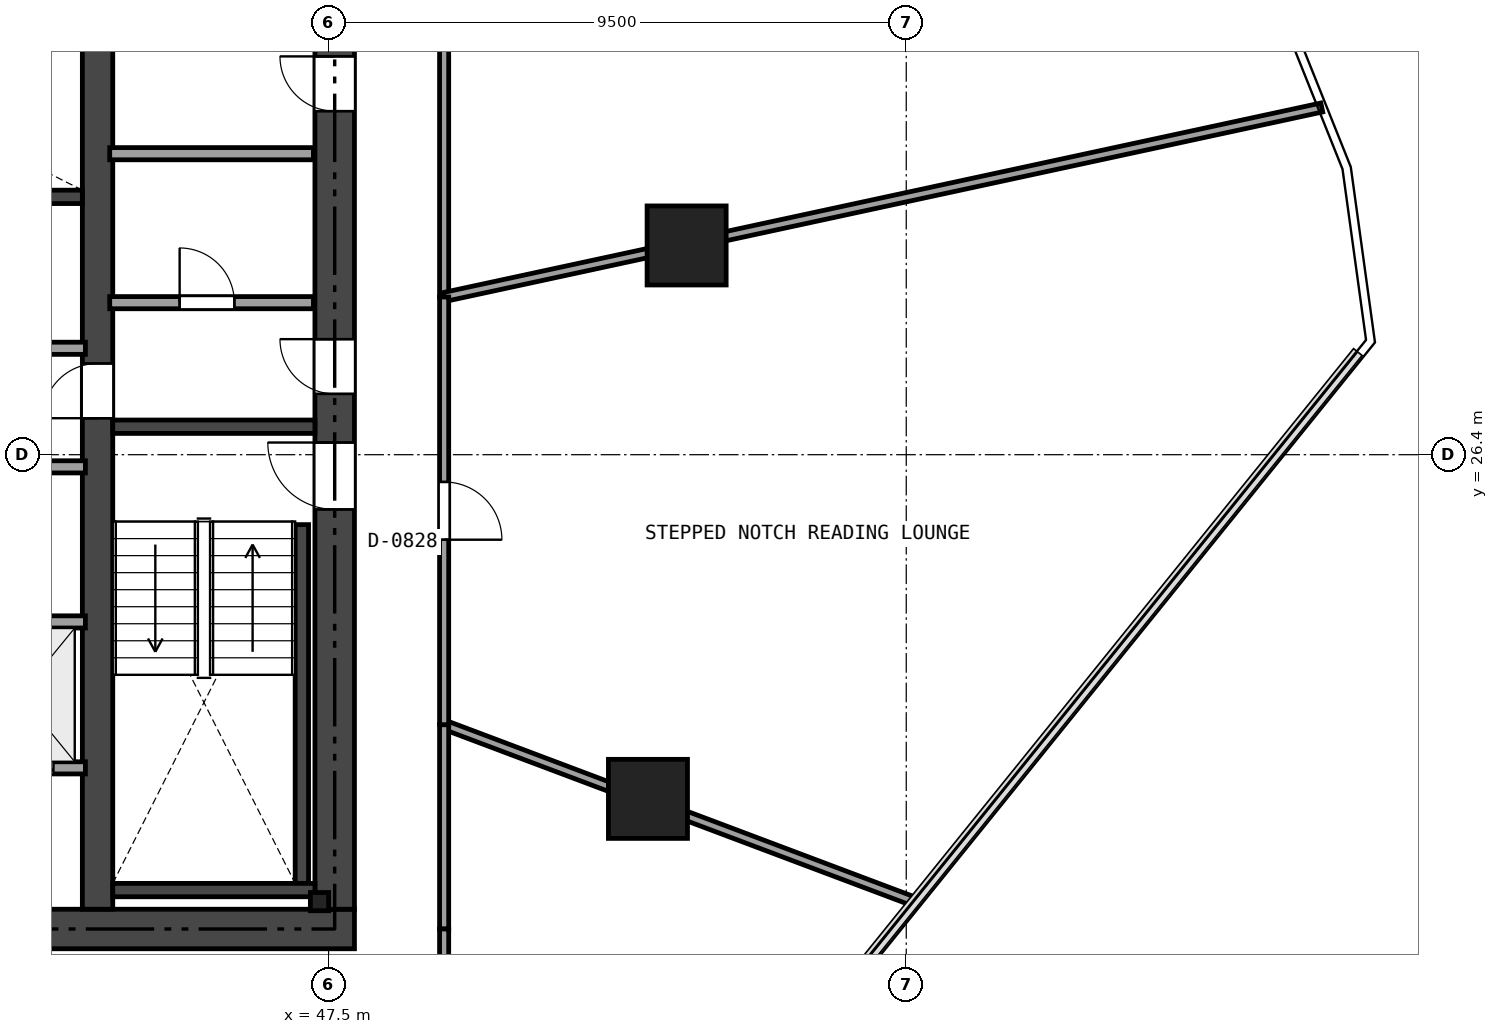
"""IFC4 building model, lengths in metres.
Left out: names, types, materials, properties, quantities, classifications, styles, units other than length and angle.
Written with IfcOpenShell. Run it as: python <this file> out.ifc"""

import sys

from ifc_helpers import new_model, si_unit, direction, frame, frame_2d, origin, origin_2d, place, context, subcontext, project, spatial, rectangle, i_section, extrude, element, fill, save


model = new_model("IFC4")
c1 = context("Model", 3, precision=1e-05, world=origin(), true_north=direction((0.0, 1.0)))
c2 = subcontext(c1, "Body", "Model", "MODEL_VIEW")
j1 = project(units=[si_unit("LENGTHUNIT", "METRE"), si_unit("PLANEANGLEUNIT", "RADIAN")], contexts=[c1])
p1 = place(None, origin())
s1 = spatial("IfcSite", under=j1, at=p1, CompositionType="ELEMENT")
p2 = place(p1, origin())
s2 = spatial("IfcBuilding", under=s1, at=p2, CompositionType="ELEMENT")
p3 = place(p2, frame((0.0, 0.0, 37.35)))
s3 = spatial("IfcBuildingStorey", under=s2, at=p3, CompositionType="ELEMENT", Elevation=37.35)
p4 = place(p3, frame((26.475, 18.6, 0.0), z_axis=(0.0, 0.0, 1.0), x_axis=(1.0, 0.0, 0.0)))
e1 = element("IfcWall", 1, at=p4, inside=s3, PredefinedType="SHEAR", context=c2, shape_type="SweptSolid", body=[
    extrude(rectangle(XDim=21.45, YDim=0.65, at=frame_2d((10.725, 0.0))), origin(), (0.0, 0.0, 1.0), 3.17),
])
p5 = place(p4, frame((12.45, 0.0, 0.0)))
e2 = element("IfcOpeningElement", 2, at=p5, cuts=e1, PredefinedType="OPENING", context=c2, shape_type="SweptSolid", body=[
    extrude(rectangle(XDim=1.15, YDim=2.15, at=frame_2d((0.575, 1.075))), frame((0.0, 0.335, 0.0), z_axis=(0.0, -1.0, 0.0), x_axis=(1.0, 0.0, 0.0)), (0.0, 0.0, 1.0), 0.67),
])
p6 = place(p4, frame((5.275, 0.0, 0.0)))
e3 = element("IfcOpeningElement", 3, at=p6, cuts=e1, PredefinedType="OPENING", context=c2, shape_type="SweptSolid", body=[
    extrude(rectangle(XDim=0.9, YDim=2.1, at=frame_2d((0.45, 1.05))), frame((0.0, 0.335, 0.0), z_axis=(0.0, -1.0, 0.0), x_axis=(1.0, 0.0, 0.0)), (0.0, 0.0, 1.0), 0.67),
])
p7 = place(p3, frame((47.6, 18.925, 0.0), z_axis=(0.0, 0.0, 1.0), x_axis=(0.0, 1.0, 0.0)))
e4 = element("IfcWall", 4, at=p7, inside=s3, PredefinedType="SHEAR", context=c2, shape_type="SweptSolid", body=[
    extrude(rectangle(XDim=14.95, YDim=0.65, at=frame_2d((7.475, 0.0))), origin(), (0.0, 0.0, 1.0), 3.17),
])
p8 = place(p7, frame((6.575, 0.0, 0.0)))
e5 = element("IfcOpeningElement", 5, at=p8, cuts=e4, PredefinedType="OPENING", context=c2, shape_type="SweptSolid", body=[
    extrude(rectangle(XDim=1.1, YDim=2.15, at=frame_2d((0.55, 1.075))), frame((0.0, 0.335, 0.0), z_axis=(0.0, -1.0, 0.0), x_axis=(1.0, 0.0, 0.0)), (0.0, 0.0, 1.0), 0.67),
])
p9 = place(p7, frame((8.475, 0.0, 0.0)))
e6 = element("IfcOpeningElement", 6, at=p9, cuts=e4, PredefinedType="OPENING", context=c2, shape_type="SweptSolid", body=[
    extrude(rectangle(XDim=0.9, YDim=2.1, at=frame_2d((0.45, 1.05))), frame((0.0, 0.335, 0.0), z_axis=(0.0, -1.0, 0.0), x_axis=(1.0, 0.0, 0.0)), (0.0, 0.0, 1.0), 0.67),
])
p10 = place(p7, frame((13.125, 0.0, 0.0)))
e7 = element("IfcOpeningElement", 7, at=p10, cuts=e4, PredefinedType="OPENING", context=c2, shape_type="SweptSolid", body=[
    extrude(rectangle(XDim=0.9, YDim=2.1, at=frame_2d((0.45, 1.05))), frame((0.0, 0.335, 0.0), z_axis=(0.0, -1.0, 0.0), x_axis=(1.0, 0.0, 0.0)), (0.0, 0.0, 1.0), 0.67),
])
p11 = place(p3, frame((43.7, 18.925, 0.0), z_axis=(0.0, 0.0, 1.0), x_axis=(0.0, 1.0, 0.0)))
e8 = element("IfcWall", 8, at=p11, inside=s3, PredefinedType="SHEAR", context=c2, shape_type="SweptSolid", body=[
    extrude(rectangle(XDim=14.95, YDim=0.5, at=frame_2d((7.475, 0.0))), origin(), (0.0, 0.0, 1.0), 3.17),
])
p12 = place(p11, frame((8.075, 0.0, 0.0)))
e9 = element("IfcOpeningElement", 9, at=p12, cuts=e8, PredefinedType="OPENING", context=c2, shape_type="SweptSolid", body=[
    extrude(rectangle(XDim=0.9, YDim=2.1, at=frame_2d((0.45, 1.05))), frame((0.0, 0.26, 0.0), z_axis=(0.0, -1.0, 0.0), x_axis=(1.0, 0.0, 0.0)), (0.0, 0.0, 1.0), 0.52),
])
p13 = place(p3, frame((43.95, 26.86, 0.0), z_axis=(0.0, 0.0, 1.0), x_axis=(1.0, 0.0, 0.0)))
e10 = element("IfcWall", 10, at=p13, inside=s3, PredefinedType="SHEAR", context=c2, shape_type="SweptSolid", body=[
    extrude(rectangle(XDim=3.325, YDim=0.22, at=frame_2d((1.663, 0.0))), origin(), (0.0, 0.0, 1.0), 3.17),
])
p14 = place(p3, frame((47.06, 19.35, 0.0), z_axis=(0.0, 0.0, 1.0), x_axis=(0.0, 1.0, 0.0)))
e11 = element("IfcWall", 11, at=p14, inside=s3, PredefinedType="SHEAR", context=c2, shape_type="SweptSolid", body=[
    extrude(rectangle(XDim=5.9, YDim=0.22, at=frame_2d((2.95, 0.0))), origin(), (0.0, 0.0, 1.0), 3.17),
])
p15 = place(p3, frame((43.95, 19.24, 0.0), z_axis=(0.0, 0.0, 1.0), x_axis=(1.0, 0.0, 0.0)))
e12 = element("IfcWall", 12, at=p15, inside=s3, PredefinedType="SHEAR", context=c2, shape_type="SweptSolid", body=[
    extrude(rectangle(XDim=3.325, YDim=0.22, at=frame_2d((1.663, 0.0))), origin(), (0.0, 0.0, 1.0), 3.17),
])
p16 = place(p3, frame((35.84, 30.64, 0.0), z_axis=(0.0, 0.0, 1.0), x_axis=(1.0, 0.0, 0.0)))
e13 = element("IfcWall", 13, at=p16, inside=s3, PredefinedType="SHEAR", context=c2, shape_type="SweptSolid", body=[
    extrude(rectangle(XDim=7.61, YDim=0.22, at=frame_2d((3.805, 0.0))), origin(), (0.0, 0.0, 1.0), 3.17),
])
for number, where, z_axis, x_axis in (
    (14, (53.388, 29.841, 0.0), (0.0, 0.0, 1.0), (1.0, 0.0, 0.0)),
    (15, (52.752, 20.74, 0.0), (0.0, 0.0, 1.0), (1.0, 0.0, 0.0)),
):
    element("IfcColumn", number, at=place(p3, frame(where, z_axis=z_axis, x_axis=x_axis)), inside=s3, PredefinedType="COLUMN", context=c2, shape_type="SweptSolid", body=[
        extrude(rectangle(XDim=1.3, YDim=1.3, at=origin_2d()), origin(), (0.0, 0.0, 1.0), 3.17),
    ])
p17 = place(p3, frame((47.35, 19.05, 0.0), z_axis=(0.0, 0.0, 1.0), x_axis=(1.0, 0.0, 0.0)))
e16 = element("IfcColumn", 16, at=p17, inside=s3, PredefinedType="PILASTER", context=c2, shape_type="SweptSolid", body=[
    extrude(i_section(OverallWidth=0.3, OverallDepth=0.3, WebThickness=0.011, FlangeThickness=0.019, at=origin_2d()), origin(), (0.0, 0.0, 1.0), 3.17),
])
p18 = place(p3, frame((43.9, 28.9, 0.0), z_axis=(0.0, 0.0, 1.0), x_axis=(1.0, 0.0, 0.0)))
e17 = element("IfcWall", 17, at=p18, inside=s3, PredefinedType="SOLIDWALL", context=c2, shape_type="SweptSolid", body=[
    extrude(rectangle(XDim=3.35, YDim=0.2, at=frame_2d((1.675, 0.0))), origin(), (0.0, 0.0, 1.0), 3.17),
])
p19 = place(p18, frame((1.15, 0.0, 0.0)))
e18 = element("IfcOpeningElement", 18, at=p19, cuts=e17, PredefinedType="OPENING", context=c2, shape_type="SweptSolid", body=[
    extrude(rectangle(XDim=0.9, YDim=2.1, at=frame_2d((0.45, 1.05))), frame((0.0, 0.11, 0.0), z_axis=(0.0, -1.0, 0.0), x_axis=(1.0, 0.0, 0.0)), (0.0, 0.0, 1.0), 0.22),
])
p20 = place(p3, frame((43.9, 31.35, 0.0), z_axis=(0.0, 0.0, 1.0), x_axis=(1.0, 0.0, 0.0)))
e19 = element("IfcWall", 19, at=p20, inside=s3, PredefinedType="SOLIDWALL", context=c2, shape_type="SweptSolid", body=[
    extrude(rectangle(XDim=3.35, YDim=0.2, at=frame_2d((1.675, 0.0))), origin(), (0.0, 0.0, 1.0), 3.17),
])
for number, where, z_axis, x_axis in (
    (20, (35.62, 28.15, 0.0), (0.0, 0.0, 1.0), (1.0, 0.0, 0.0)),
    (21, (35.62, 26.2, 0.0), (0.0, 0.0, 1.0), (1.0, 0.0, 0.0)),
):
    element("IfcWall", number, at=place(p3, frame(where, z_axis=z_axis, x_axis=x_axis)), inside=s3, PredefinedType="SOLIDWALL", context=c2, shape_type="SweptSolid", body=[
        extrude(rectangle(XDim=7.88, YDim=0.2, at=frame_2d((3.94, 0.0))), origin(), (0.0, 0.0, 1.0), 3.17),
    ])
p21 = place(p3, frame((35.62, 23.65, 0.0), z_axis=(0.0, 0.0, 1.0), x_axis=(1.0, 0.0, 0.0)))
e22 = element("IfcWall", 22, at=p21, inside=s3, PredefinedType="SOLIDWALL", context=c2, shape_type="SweptSolid", body=[
    extrude(rectangle(XDim=7.88, YDim=0.2, at=frame_2d((3.94, 0.0))), origin(), (0.0, 0.0, 1.0), 2.691),
])
p22 = place(p3, frame((35.62, 21.25, 0.0), z_axis=(0.0, 0.0, 1.0), x_axis=(1.0, 0.0, 0.0)))
e23 = element("IfcWall", 23, at=p22, inside=s3, PredefinedType="SOLIDWALL", context=c2, shape_type="SweptSolid", body=[
    extrude(rectangle(XDim=7.88, YDim=0.2, at=frame_2d((3.94, 0.0))), origin(), (0.0, 0.0, 1.0), 3.17),
])
p23 = place(p22, frame((0.405, 0.0, 0.0)))
e24 = element("IfcOpeningElement", 24, at=p23, cuts=e23, PredefinedType="OPENING", context=c2, shape_type="SweptSolid", body=[
    extrude(rectangle(XDim=1.1, YDim=2.15, at=frame_2d((0.55, 1.075))), frame((0.0, 0.11, 0.0), z_axis=(0.0, -1.0, 0.0), x_axis=(1.0, 0.0, 0.0)), (0.0, 0.0, 1.0), 0.22),
])
p24 = place(p22, frame((2.355, 0.0, 0.0)))
e25 = element("IfcOpeningElement", 25, at=p24, cuts=e23, PredefinedType="OPENING", context=c2, shape_type="SweptSolid", body=[
    extrude(rectangle(XDim=1.1, YDim=2.15, at=frame_2d((0.55, 1.075))), frame((0.0, 0.11, 0.0), z_axis=(0.0, -1.0, 0.0), x_axis=(1.0, 0.0, 0.0)), (0.0, 0.0, 1.0), 0.22),
])
p25 = place(p22, frame((4.305, 0.0, 0.0)))
e26 = element("IfcOpeningElement", 26, at=p25, cuts=e23, PredefinedType="OPENING", context=c2, shape_type="SweptSolid", body=[
    extrude(rectangle(XDim=1.1, YDim=2.15, at=frame_2d((0.55, 1.075))), frame((0.0, 0.11, 0.0), z_axis=(0.0, -1.0, 0.0), x_axis=(1.0, 0.0, 0.0)), (0.0, 0.0, 1.0), 0.22),
])
p26 = place(p22, frame((6.255, 0.0, 0.0)))
e27 = element("IfcOpeningElement", 27, at=p26, cuts=e23, PredefinedType="OPENING", context=c2, shape_type="SweptSolid", body=[
    extrude(rectangle(XDim=1.1, YDim=2.15, at=frame_2d((0.55, 1.075))), frame((0.0, 0.11, 0.0), z_axis=(0.0, -1.0, 0.0), x_axis=(1.0, 0.0, 0.0)), (0.0, 0.0, 1.0), 0.22),
])
p27 = place(p3, frame((49.4, 34.2, 0.0), z_axis=(0.0, 0.0, 1.0), x_axis=(0.0, -1.0, 0.0)))
e28 = element("IfcWall", 28, at=p27, inside=s3, PredefinedType="PARTITIONING", context=c2, shape_type="SweptSolid", body=[
    extrude(rectangle(XDim=5.207, YDim=0.15, at=frame_2d((2.604, 0.0))), origin(), (0.0, 0.0, 1.0), 2.395),
])
p28 = place(p3, frame((49.4, 28.993, 0.0), z_axis=(0.0, 0.0, 1.0), x_axis=(0.977465823559, 0.211093732201, 0.0)))
e29 = element("IfcWall", 29, at=p28, inside=s3, PredefinedType="PARTITIONING", context=c2, shape_type="SweptSolid", body=[
    extrude(rectangle(XDim=14.767, YDim=0.15, at=frame_2d((7.383, 0.0))), origin(), (0.0, 0.0, 1.0), 2.395),
])
p29 = place(p3, frame((57.175, 19.034, 0.0), z_axis=(0.0, 0.0, 1.0), x_axis=(-0.935919122146, 0.352214986621, 0.0)))
e30 = element("IfcWall", 30, at=p29, inside=s3, PredefinedType="PARTITIONING", context=c2, shape_type="SweptSolid", body=[
    extrude(rectangle(XDim=8.308, YDim=0.15, at=frame_2d((4.154, 0.0))), origin(), (0.0, 0.0, 1.0), 2.395),
])
p30 = place(p3, frame((49.4, 21.96, 0.0), z_axis=(0.0, 0.0, 1.0), x_axis=(0.0, -1.0, 0.0)))
e31 = element("IfcWall", 31, at=p30, inside=s3, PredefinedType="PARTITIONING", context=c2, shape_type="SweptSolid", body=[
    extrude(rectangle(XDim=3.36, YDim=0.15, at=frame_2d((1.68, 0.0))), origin(), (0.0, 0.0, 1.0), 2.395),
])
p31 = place(p3, frame((49.4, 18.6, 0.0), z_axis=(0.0, 0.0, 1.0), x_axis=(0.0, -1.0, 0.0)))
e32 = element("IfcWall", 32, at=p31, inside=s3, PredefinedType="PARTITIONING", context=c2, shape_type="SweptSolid", body=[
    extrude(rectangle(XDim=1.8, YDim=0.15, at=frame_2d((0.9, 0.0))), origin(), (0.0, 0.0, 1.0), 2.355),
])
p32 = place(p3, frame((49.4, 28.993, 0.0), z_axis=(0.0, 0.0, 1.0), x_axis=(0.0, -1.0, 0.0)))
e33 = element("IfcWall", 33, at=p32, inside=s3, PredefinedType="PARTITIONING", context=c2, shape_type="SweptSolid", body=[
    extrude(rectangle(XDim=7.033, YDim=0.15, at=frame_2d((3.517, 0.0))), origin(), (0.0, 0.0, 1.0), 2.395),
])
p33 = place(p32, frame((3.041, 0.0, 0.0)))
e34 = element("IfcOpeningElement", 34, at=p33, cuts=e33, PredefinedType="OPENING", context=c2, shape_type="SweptSolid", body=[
    extrude(rectangle(XDim=0.95, YDim=2.15, at=frame_2d((0.475, 1.075))), frame((0.0, 0.085, 0.0), z_axis=(0.0, -1.0, 0.0), x_axis=(1.0, 0.0, 0.0)), (0.0, 0.0, 1.0), 0.17),
])
p34 = place(p8, origin())
e35 = element("IfcDoor", 35, at=p34, inside=s3, OperationType="SINGLE_SWING_RIGHT", PredefinedType="DOOR", context=c2, shape_type="SweptSolid", body=[
    extrude(rectangle(XDim=1.1, YDim=2.15, at=frame_2d((0.55, 1.075))), frame((0.0, 0.025, 0.0), z_axis=(0.0, -1.0, 0.0), x_axis=(1.0, 0.0, 0.0)), (0.0, 0.0, 1.0), 0.05),
])
fill(e5, e35)
p35 = place(p12, origin())
e36 = element("IfcDoor", 36, at=p35, inside=s3, OperationType="SINGLE_SWING_LEFT", PredefinedType="DOOR", context=c2, shape_type="SweptSolid", body=[
    extrude(rectangle(XDim=0.9, YDim=2.1, at=frame_2d((0.45, 1.05))), frame((0.0, 0.025, 0.0), z_axis=(0.0, -1.0, 0.0), x_axis=(1.0, 0.0, 0.0)), (0.0, 0.0, 1.0), 0.05),
])
fill(e9, e36)
p36 = place(p9, origin())
e37 = element("IfcDoor", 37, at=p36, inside=s3, OperationType="SINGLE_SWING_RIGHT", PredefinedType="DOOR", context=c2, shape_type="SweptSolid", body=[
    extrude(rectangle(XDim=0.9, YDim=2.1, at=frame_2d((0.45, 1.05))), frame((0.0, 0.025, 0.0), z_axis=(0.0, -1.0, 0.0), x_axis=(1.0, 0.0, 0.0)), (0.0, 0.0, 1.0), 0.05),
])
fill(e6, e37)
p37 = place(p19, origin())
e38 = element("IfcDoor", 38, at=p37, inside=s3, OperationType="SINGLE_SWING_LEFT", PredefinedType="DOOR", context=c2, shape_type="SweptSolid", body=[
    extrude(rectangle(XDim=0.9, YDim=2.1, at=frame_2d((0.45, 1.05))), frame((0.0, 0.025, 0.0), z_axis=(0.0, -1.0, 0.0), x_axis=(1.0, 0.0, 0.0)), (0.0, 0.0, 1.0), 0.05),
])
fill(e18, e38)
p38 = place(p10, origin())
e39 = element("IfcDoor", 39, at=p38, inside=s3, OperationType="SINGLE_SWING_RIGHT", PredefinedType="DOOR", context=c2, shape_type="SweptSolid", body=[
    extrude(rectangle(XDim=0.9, YDim=2.1, at=frame_2d((0.45, 1.05))), frame((0.0, 0.025, 0.0), z_axis=(0.0, -1.0, 0.0), x_axis=(1.0, 0.0, 0.0)), (0.0, 0.0, 1.0), 0.05),
])
fill(e7, e39)
p39 = place(p26, origin())
e40 = element("IfcDoor", 40, at=p39, inside=s3, OperationType="SLIDING_TO_LEFT", PredefinedType="DOOR", context=c2, shape_type="SweptSolid", body=[
    extrude(rectangle(XDim=1.1, YDim=2.15, at=frame_2d((0.55, 1.075))), frame((0.0, 0.025, 0.0), z_axis=(0.0, -1.0, 0.0), x_axis=(1.0, 0.0, 0.0)), (0.0, 0.0, 1.0), 0.05),
])
fill(e27, e40)
p40 = place(p33, origin())
e41 = element("IfcDoor", 41, at=p40, inside=s3, OperationType="SINGLE_SWING_RIGHT", PredefinedType="DOOR", context=c2, shape_type="SweptSolid", body=[
    extrude(rectangle(XDim=0.95, YDim=2.15, at=frame_2d((0.475, 1.075))), frame((0.0, 0.025, 0.0), z_axis=(0.0, -1.0, 0.0), x_axis=(1.0, 0.0, 0.0)), (0.0, 0.0, 1.0), 0.05),
])
fill(e34, e41)
save(model, sys.argv[1])
